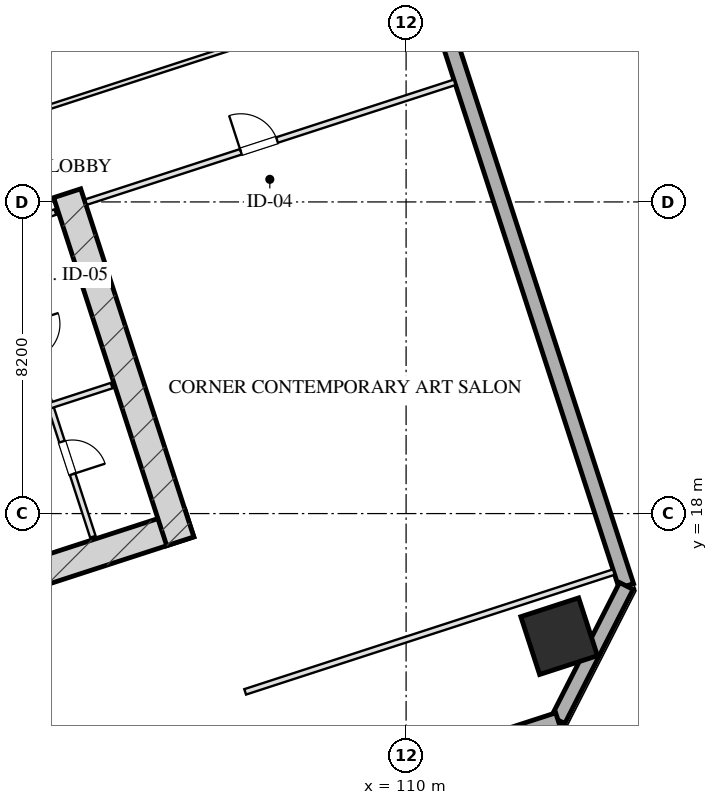
"""IFC4 building model, lengths in metres.
Left out: names, types, materials, properties, quantities, classifications, styles, units other than length and angle.
Written with IfcOpenShell. Run it as: python <this file> out.ifc"""

import sys

from ifc_helpers import new_model, si_unit, direction, frame, frame_2d, origin, origin_2d, place, context, subcontext, project, spatial, rectangle, hollow_rectangle, extrude, element, fill, save


model = new_model("IFC4")
c1 = context("Model", 3, precision=1e-05, world=origin(), true_north=direction((0.0, 1.0)))
c2 = subcontext(c1, "Body", "Model", "MODEL_VIEW")
j1 = project(units=[si_unit("LENGTHUNIT", "METRE"), si_unit("PLANEANGLEUNIT", "RADIAN")], contexts=[c1])
p1 = place(None, origin())
s1 = spatial("IfcSite", under=j1, at=p1, CompositionType="ELEMENT")
p2 = place(p1, origin())
s2 = spatial("IfcBuilding", under=s1, at=p2, CompositionType="ELEMENT")
p3 = place(p2, frame((0.0, 0.0, 60.95)))
s3 = spatial("IfcBuildingStorey", under=s2, at=p3, CompositionType="ELEMENT", Elevation=60.95)
p4 = place(p3, frame((88.559, 12.629, 0.0), z_axis=(0.0, 0.0, 1.0), x_axis=(0.951056072937, 0.309018358888, 0.0)))
e1 = element("IfcWall", 1, at=p4, inside=s3, PredefinedType="SHEAR", context=c2, shape_type="SweptSolid", body=[
    extrude(rectangle(XDim=16.55, YDim=0.75, at=frame_2d((8.275, 0.0))), origin(), (0.0, 0.0, 1.0), 3.45),
])
p5 = place(p3, frame((101.082, 26.429, 0.0), z_axis=(0.0, 0.0, 1.0), x_axis=(0.309016134813, -0.951056795583, 0.0)))
e2 = element("IfcWall", 2, at=p5, inside=s3, PredefinedType="SHEAR", context=c2, shape_type="SweptSolid", body=[
    extrude(rectangle(XDim=9.63, YDim=0.75, at=frame_2d((4.815, 0.0))), origin(), (0.0, 0.0, 1.0), 3.45),
])
p6 = place(p3, frame((114.027, 14.774, 0.0), z_axis=(0.0, 0.0, 1.0), x_axis=(0.951056516295, 0.309016994375, 0.0)))
e3 = element("IfcColumn", 3, at=p6, inside=s3, PredefinedType="COLUMN", context=c2, shape_type="SweptSolid", body=[
    extrude(hollow_rectangle(XDim=1.6, YDim=1.6, WallThickness=0.055, at=origin_2d()), origin(), (0.0, 0.0, 1.0), 3.451),
])
p7 = place(p3, frame((100.345, 63.648, 0.0), z_axis=(0.0, 0.0, 1.0), x_axis=(0.309014526607, -0.951057318118, 0.0)))
e4 = element("IfcWall", 4, at=p7, inside=s3, PredefinedType="SOLIDWALL", context=c2, shape_type="SweptSolid", body=[
    extrude(rectangle(XDim=50.0, YDim=0.4, at=frame_2d((25.0, 0.0))), origin(), (0.0, 0.0, 1.0), 2.61),
])
p8 = place(p7, frame((27.55, 0.0, 0.0)))
e5 = element("IfcOpeningElement", 5, at=p8, cuts=e4, PredefinedType="OPENING", context=c2, shape_type="SweptSolid", body=[
    extrude(rectangle(XDim=1.1, YDim=2.15, at=frame_2d((0.55, 1.075))), frame((0.0, 0.21, 0.0), z_axis=(0.0, -1.0, 0.0), x_axis=(1.0, 0.0, 0.0)), (0.0, 0.0, 1.0), 0.42),
])
p9 = place(p3, frame((115.795, 16.095, 0.0), z_axis=(0.0, 0.0, 1.0), x_axis=(-0.453958106755, -0.891023028497, 0.0)))
e6 = element("IfcWall", 6, at=p9, inside=s3, PredefinedType="SOLIDWALL", context=c2, shape_type="SweptSolid", body=[
    extrude(rectangle(XDim=3.96, YDim=0.4, at=frame_2d((1.98, 0.0))), origin(), (0.0, 0.0, 1.0), 2.61),
])
p10 = place(p3, frame((113.998, 12.567, 0.0), z_axis=(0.0, 0.0, 1.0), x_axis=(-0.951055939317, -0.309018770125, 0.0)))
e7 = element("IfcWall", 7, at=p10, inside=s3, PredefinedType="SOLIDWALL", context=c2, shape_type="SweptSolid", body=[
    extrude(rectangle(XDim=32.4, YDim=0.4, at=frame_2d((16.2, 0.0))), origin(), (0.0, 0.0, 1.0), 2.61),
])
p11 = place(p3, frame((97.727, 24.944, 0.0), z_axis=(0.0, 0.0, 1.0), x_axis=(0.951036872128, 0.309077446369, 0.0)))
e8 = element("IfcWall", 8, at=p11, inside=s3, PredefinedType="PARTITIONING", context=c2, shape_type="SweptSolid", body=[
    extrude(rectangle(XDim=3.2, YDim=0.15, at=frame_2d((1.6, 0.0))), origin(), (0.0, 0.0, 1.0), 3.175),
])
p12 = place(p11, frame((0.22, 0.0, 0.0)))
e9 = element("IfcOpeningElement", 9, at=p12, cuts=e8, PredefinedType="OPENING", context=c2, shape_type="SweptSolid", body=[
    extrude(rectangle(XDim=0.95, YDim=2.05, at=frame_2d((0.475, 1.025))), frame((0.0, 0.085, 0.0), z_axis=(0.0, -1.0, 0.0), x_axis=(1.0, 0.0, 0.0)), (0.0, 0.0, 1.0), 0.17),
])
p13 = place(p3, frame((99.153, 25.408, 0.0), z_axis=(0.0, 0.0, 1.0), x_axis=(0.309016001439, -0.951056838919, 0.0)))
e10 = element("IfcWall", 10, at=p13, inside=s3, PredefinedType="PARTITIONING", context=c2, shape_type="SweptSolid", body=[
    extrude(rectangle(XDim=8.43, YDim=0.15, at=frame_2d((4.215, 0.0))), origin(), (0.0, 0.0, 1.0), 3.175),
])
p14 = place(p13, frame((2.55, 0.0, 0.0)))
e11 = element("IfcOpeningElement", 11, at=p14, cuts=e10, PredefinedType="OPENING", context=c2, shape_type="SweptSolid", body=[
    extrude(rectangle(XDim=0.95, YDim=2.05, at=frame_2d((0.475, 1.025))), frame((0.0, 0.085, 0.0), z_axis=(0.0, -1.0, 0.0), x_axis=(1.0, 0.0, 0.0)), (0.0, 0.0, 1.0), 0.17),
])
p15 = place(p13, frame((5.8, 0.0, 0.0)))
e12 = element("IfcOpeningElement", 12, at=p15, cuts=e10, PredefinedType="OPENING", context=c2, shape_type="SweptSolid", body=[
    extrude(rectangle(XDim=0.9, YDim=2.05, at=frame_2d((0.45, 1.025))), frame((0.0, 0.085, 0.0), z_axis=(0.0, -1.0, 0.0), x_axis=(1.0, 0.0, 0.0)), (0.0, 0.0, 1.0), 0.17),
])
p16 = place(p3, frame((100.636, 20.843, 0.0), z_axis=(0.0, 0.0, 1.0), x_axis=(0.951040401051, 0.309066587596, 0.0)))
e13 = element("IfcWall", 13, at=p16, inside=s3, PredefinedType="PARTITIONING", context=c2, shape_type="SweptSolid", body=[
    extrude(rectangle(XDim=1.7, YDim=0.15, at=frame_2d((0.85, 0.0))), origin(), (0.0, 0.0, 1.0), 3.175),
])
p17 = place(p3, frame((105.765, 13.309, 0.0), z_axis=(0.0, 0.0, 1.0), x_axis=(0.951054294345, 0.309023832749, 0.0)))
e14 = element("IfcWall", 14, at=p17, inside=s3, PredefinedType="PARTITIONING", context=c2, shape_type="SweptSolid", body=[
    extrude(rectangle(XDim=10.2, YDim=0.15, at=frame_2d((5.1, 0.0))), origin(), (0.0, 0.0, 1.0), 3.175),
])
p18 = place(p3, frame((101.578, 26.196, 0.0), z_axis=(0.0, 0.0, 1.0), x_axis=(0.951059043131, 0.309009217467, 0.0)))
e15 = element("IfcWall", 15, at=p18, inside=s3, PredefinedType="PARTITIONING", context=c2, shape_type="SweptSolid", body=[
    extrude(rectangle(XDim=10.2, YDim=0.15, at=frame_2d((5.1, 0.0))), origin(), (0.0, 0.0, 1.0), 3.175),
])
p19 = place(p18, frame((4.284, 0.0, 0.0)))
e16 = element("IfcOpeningElement", 16, at=p19, cuts=e15, PredefinedType="OPENING", context=c2, shape_type="SweptSolid", body=[
    extrude(rectangle(XDim=1.0, YDim=2.05, at=frame_2d((0.5, 1.025))), frame((0.0, 0.085, 0.0), z_axis=(0.0, -1.0, 0.0), x_axis=(1.0, 0.0, 0.0)), (0.0, 0.0, 1.0), 0.17),
])
for number, where, z_axis, x_axis in (
    (17, (93.546, 26.404, 0.0), (0.0, 0.0, 1.0), (0.951, 0.309, 0.0)),
    (18, (92.52, 29.562, 0.0), (0.0, 0.0, 1.0), (0.951, 0.309, 0.0)),
):
    element("IfcWall", number, at=place(p3, frame(where, z_axis=z_axis, x_axis=x_axis)), inside=s3, PredefinedType="PARTITIONING", context=c2, shape_type="SweptSolid", body=[
        extrude(rectangle(XDim=17.775, YDim=0.12, at=frame_2d((8.887, 0.0))), origin(), (0.0, 0.0, 1.0), 3.175),
    ])
p20 = place(p15, origin())
e19 = element("IfcDoor", 19, at=p20, inside=s3, OperationType="SINGLE_SWING_RIGHT", PredefinedType="DOOR", context=c2, shape_type="SweptSolid", body=[
    extrude(rectangle(XDim=0.9, YDim=2.05, at=frame_2d((0.45, 1.025))), frame((0.0, 0.025, 0.0), z_axis=(0.0, -1.0, 0.0), x_axis=(1.0, 0.0, 0.0)), (0.0, 0.0, 1.0), 0.05),
])
fill(e12, e19)
p21 = place(p19, origin())
e20 = element("IfcDoor", 20, at=p21, inside=s3, OperationType="SINGLE_SWING_LEFT", PredefinedType="DOOR", context=c2, shape_type="SweptSolid", body=[
    extrude(rectangle(XDim=1.0, YDim=2.05, at=frame_2d((0.5, 1.025))), frame((0.0, 0.025, 0.0), z_axis=(0.0, -1.0, 0.0), x_axis=(1.0, 0.0, 0.0)), (0.0, 0.0, 1.0), 0.05),
])
fill(e16, e20)
save(model, sys.argv[1])
